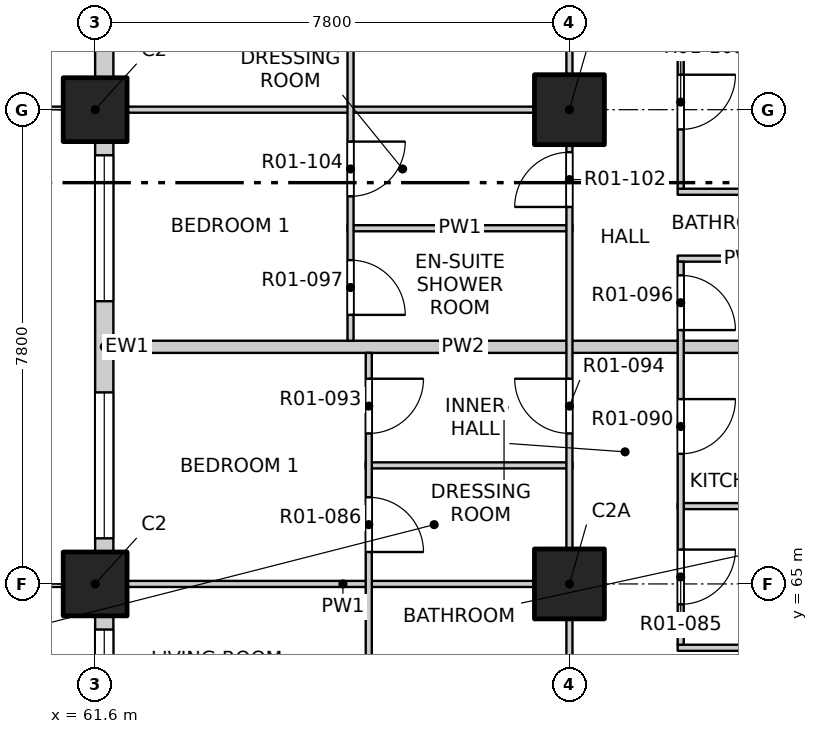
"""IFC4 building model, lengths in metres.
Left out: names, types, materials, properties, quantities, classifications, styles, units other than length and angle.
Written with IfcOpenShell. Run it as: python <this file> out.ifc"""

import sys

from ifc_helpers import new_model, si_unit, direction, frame, frame_2d, origin, origin_2d, place, context, subcontext, project, spatial, rectangle, extrude, element, fill, save


model = new_model("IFC4")
c1 = context("Model", 3, precision=1e-05, world=origin(), true_north=direction((0.0, 1.0)))
c2 = subcontext(c1, "Body", "Model", "MODEL_VIEW")
j1 = project(units=[si_unit("LENGTHUNIT", "METRE"), si_unit("PLANEANGLEUNIT", "RADIAN")], contexts=[c1])
p1 = place(None, origin())
s1 = spatial("IfcSite", under=j1, at=p1, CompositionType="ELEMENT")
p2 = place(p1, origin())
s2 = spatial("IfcBuilding", under=s1, at=p2, CompositionType="ELEMENT")
p3 = place(p2, frame((0.0, 0.0, 19.5)))
s3 = spatial("IfcBuildingStorey", under=s2, at=p3, CompositionType="ELEMENT", Elevation=19.5)
for number, where, z_axis, x_axis in (
    (1, (61.6, 65.0, -0.25), (0.0, 0.0, 1.0), (1.0, 0.0, 0.0)),
    (2, (61.6, 72.8, -0.25), (0.0, 0.0, 1.0), (1.0, 0.0, 0.0)),
):
    element("IfcColumn", number, at=place(p3, frame(where, z_axis=z_axis, x_axis=x_axis)), inside=s3, PredefinedType="COLUMN", context=c2, shape_type="SweptSolid", body=[
        extrude(rectangle(XDim=1.05, YDim=1.05, at=origin_2d()), origin(), (0.0, 0.0, 1.0), 3.4),
    ])
for number, where, z_axis, x_axis in (
    (3, (69.4, 65.0, -0.25), (0.0, 0.0, 1.0), (1.0, 0.0, 0.0)),
    (4, (69.4, 72.8, -0.25), (0.0, 0.0, 1.0), (1.0, 0.0, 0.0)),
):
    element("IfcColumn", number, at=place(p3, frame(where, z_axis=z_axis, x_axis=x_axis)), inside=s3, PredefinedType="COLUMN", context=c2, shape_type="SweptSolid", body=[
        extrude(rectangle(XDim=1.15, YDim=1.15, at=origin_2d()), origin(), (0.0, 0.0, 1.0), 3.4),
    ])
p4 = place(p3, frame((61.75, 57.725, 0.0), z_axis=(0.0, 0.0, 1.0), x_axis=(0.0, 1.0, 0.0)))
e5 = element("IfcWall", 5, at=p4, inside=s3, PredefinedType="SOLIDWALL", context=c2, shape_type="SweptSolid", body=[
    extrude(rectangle(XDim=6.75, YDim=0.3, at=frame_2d((3.375, 0.0))), origin(), (0.0, 0.0, 1.0), 2.7),
])
p5 = place(p4, frame((0.525, 0.0, 0.0)))
e6 = element("IfcOpeningElement", 6, at=p5, cuts=e5, PredefinedType="OPENING", context=c2, shape_type="SweptSolid", body=[
    extrude(rectangle(XDim=1.8, YDim=2.4, at=frame_2d((0.9, 1.2))), frame((0.0, 0.16, 0.0), z_axis=(0.0, -1.0, 0.0), x_axis=(1.0, 0.0, 0.0)), (0.0, 0.0, 1.0), 0.32),
])
p6 = place(p4, frame((4.125, 0.0, 0.9)))
e7 = element("IfcOpeningElement", 7, at=p6, cuts=e5, PredefinedType="OPENING", context=c2, shape_type="SweptSolid", body=[
    extrude(rectangle(XDim=2.4, YDim=1.8, at=frame_2d((1.2, 0.9))), frame((0.0, 0.16, 0.0), z_axis=(0.0, -1.0, 0.0), x_axis=(1.0, 0.0, 0.0)), (0.0, 0.0, 1.0), 0.32),
])
p7 = place(p3, frame((61.75, 65.525, 0.0), z_axis=(0.0, 0.0, 1.0), x_axis=(0.0, 1.0, 0.0)))
e8 = element("IfcWall", 8, at=p7, inside=s3, PredefinedType="SOLIDWALL", context=c2, shape_type="SweptSolid", body=[
    extrude(rectangle(XDim=6.75, YDim=0.3, at=frame_2d((3.375, 0.0))), origin(), (0.0, 0.0, 1.0), 2.7),
])
p8 = place(p7, frame((0.225, 0.0, 0.9)))
e9 = element("IfcOpeningElement", 9, at=p8, cuts=e8, PredefinedType="OPENING", context=c2, shape_type="SweptSolid", body=[
    extrude(rectangle(XDim=2.4, YDim=1.8, at=frame_2d((1.2, 0.9))), frame((0.0, 0.16, 0.0), z_axis=(0.0, -1.0, 0.0), x_axis=(1.0, 0.0, 0.0)), (0.0, 0.0, 1.0), 0.32),
])
p9 = place(p7, frame((4.125, 0.0, 0.9)))
e10 = element("IfcOpeningElement", 10, at=p9, cuts=e8, PredefinedType="OPENING", context=c2, shape_type="SweptSolid", body=[
    extrude(rectangle(XDim=2.4, YDim=1.8, at=frame_2d((1.2, 0.9))), frame((0.0, 0.16, 0.0), z_axis=(0.0, -1.0, 0.0), x_axis=(1.0, 0.0, 0.0)), (0.0, 0.0, 1.0), 0.32),
])
p10 = place(p3, frame((61.75, 73.325, 0.0), z_axis=(0.0, 0.0, 1.0), x_axis=(0.0, 1.0, 0.0)))
e11 = element("IfcWall", 11, at=p10, inside=s3, PredefinedType="SOLIDWALL", context=c2, shape_type="SweptSolid", body=[
    extrude(rectangle(XDim=6.75, YDim=0.3, at=frame_2d((3.375, 0.0))), origin(), (0.0, 0.0, 1.0), 2.7),
])
p11 = place(p10, frame((0.525, 0.0, 0.0)))
e12 = element("IfcOpeningElement", 12, at=p11, cuts=e11, PredefinedType="OPENING", context=c2, shape_type="SweptSolid", body=[
    extrude(rectangle(XDim=1.8, YDim=2.4, at=frame_2d((0.9, 1.2))), frame((0.0, 0.16, 0.0), z_axis=(0.0, -1.0, 0.0), x_axis=(1.0, 0.0, 0.0)), (0.0, 0.0, 1.0), 0.32),
])
p12 = place(p10, frame((4.125, 0.0, 0.9)))
e13 = element("IfcOpeningElement", 13, at=p12, cuts=e11, PredefinedType="OPENING", context=c2, shape_type="SweptSolid", body=[
    extrude(rectangle(XDim=2.4, YDim=1.8, at=frame_2d((1.2, 0.9))), frame((0.0, 0.16, 0.0), z_axis=(0.0, -1.0, 0.0), x_axis=(1.0, 0.0, 0.0)), (0.0, 0.0, 1.0), 0.32),
])
p13 = place(p3, frame((71.18, 63.95, 0.0), z_axis=(0.0, 0.0, 1.0), x_axis=(1.0, 0.0, 0.0)))
e14 = element("IfcWall", 14, at=p13, inside=s3, PredefinedType="PARTITIONING", context=c2, shape_type="SweptSolid", body=[
    extrude(rectangle(XDim=2.22, YDim=0.1, at=frame_2d((1.11, 0.0))), origin(), (0.0, 0.0, 1.0), 3.15),
])
p14 = place(p3, frame((61.9, 65.0, 0.0), z_axis=(0.0, 0.0, 1.0), x_axis=(1.0, 0.0, 0.0)))
e15 = element("IfcWall", 15, at=p14, inside=s3, PredefinedType="PARTITIONING", context=c2, shape_type="SweptSolid", body=[
    extrude(rectangle(XDim=7.55, YDim=0.1, at=frame_2d((3.775, 0.0))), origin(), (0.0, 0.0, 1.0), 2.55),
])
p15 = place(p3, frame((71.18, 66.28, 0.0), z_axis=(0.0, 0.0, 1.0), x_axis=(1.0, 0.0, 0.0)))
e16 = element("IfcWall", 16, at=p15, inside=s3, PredefinedType="PARTITIONING", context=c2, shape_type="SweptSolid", body=[
    extrude(rectangle(XDim=2.22, YDim=0.1, at=frame_2d((1.11, 0.0))), origin(), (0.0, 0.0, 1.0), 3.15),
])
p16 = place(p3, frame((66.05, 66.95, 0.0), z_axis=(0.0, 0.0, 1.0), x_axis=(1.0, 0.0, 0.0)))
e17 = element("IfcWall", 17, at=p16, inside=s3, PredefinedType="PARTITIONING", context=c2, shape_type="SweptSolid", body=[
    extrude(rectangle(XDim=3.4, YDim=0.1, at=frame_2d((1.7, 0.0))), origin(), (0.0, 0.0, 1.0), 3.15),
])
p17 = place(p3, frame((61.9, 68.9, 0.0), z_axis=(0.0, 0.0, 1.0), x_axis=(1.0, 0.0, 0.0)))
e18 = element("IfcWall", 18, at=p17, inside=s3, PredefinedType="PARTITIONING", context=c2, shape_type="SweptSolid", body=[
    extrude(rectangle(XDim=11.5, YDim=0.2, at=frame_2d((5.75, 0.0))), origin(), (0.0, 0.0, 1.0), 3.15),
])
p18 = place(p3, frame((71.18, 70.35, 0.0), z_axis=(0.0, 0.0, 1.0), x_axis=(1.0, 0.0, 0.0)))
e19 = element("IfcWall", 19, at=p18, inside=s3, PredefinedType="PARTITIONING", context=c2, shape_type="SweptSolid", body=[
    extrude(rectangle(XDim=2.22, YDim=0.1, at=frame_2d((1.11, 0.0))), origin(), (0.0, 0.0, 1.0), 3.15),
])
p19 = place(p3, frame((65.75, 70.85, 0.0), z_axis=(0.0, 0.0, 1.0), x_axis=(1.0, 0.0, 0.0)))
e20 = element("IfcWall", 20, at=p19, inside=s3, PredefinedType="PARTITIONING", context=c2, shape_type="SweptSolid", body=[
    extrude(rectangle(XDim=3.7, YDim=0.1, at=frame_2d((1.85, 0.0))), origin(), (0.0, 0.0, 1.0), 3.15),
])
p20 = place(p3, frame((71.18, 71.45, 0.0), z_axis=(0.0, 0.0, 1.0), x_axis=(1.0, 0.0, 0.0)))
e21 = element("IfcWall", 21, at=p20, inside=s3, PredefinedType="PARTITIONING", context=c2, shape_type="SweptSolid", body=[
    extrude(rectangle(XDim=2.22, YDim=0.1, at=frame_2d((1.11, 0.0))), origin(), (0.0, 0.0, 1.0), 3.15),
])
p21 = place(p3, frame((61.9, 72.8, 0.0), z_axis=(0.0, 0.0, 1.0), x_axis=(1.0, 0.0, 0.0)))
e22 = element("IfcWall", 22, at=p21, inside=s3, PredefinedType="PARTITIONING", context=c2, shape_type="SweptSolid", body=[
    extrude(rectangle(XDim=7.55, YDim=0.1, at=frame_2d((3.775, 0.0))), origin(), (0.0, 0.0, 1.0), 2.55),
])
p22 = place(p3, frame((65.8, 69.0, 0.0), z_axis=(0.0, 0.0, 1.0), x_axis=(0.0, 1.0, 0.0)))
e23 = element("IfcWall", 23, at=p22, inside=s3, PredefinedType="PARTITIONING", context=c2, shape_type="SweptSolid", body=[
    extrude(rectangle(XDim=7.6, YDim=0.1, at=frame_2d((3.8, 0.0))), origin(), (0.0, 0.0, 1.0), 3.15),
])
p23 = place(p22, frame((0.425, 0.0, 0.0)))
e24 = element("IfcOpeningElement", 24, at=p23, cuts=e23, PredefinedType="OPENING", context=c2, shape_type="SweptSolid", body=[
    extrude(rectangle(XDim=0.9, YDim=2.1, at=frame_2d((0.45, 1.05))), frame((0.0, 0.06, 0.0), z_axis=(0.0, -1.0, 0.0), x_axis=(1.0, 0.0, 0.0)), (0.0, 0.0, 1.0), 0.12),
])
p24 = place(p22, frame((2.375, 0.0, 0.0)))
e25 = element("IfcOpeningElement", 25, at=p24, cuts=e23, PredefinedType="OPENING", context=c2, shape_type="SweptSolid", body=[
    extrude(rectangle(XDim=0.9, YDim=2.1, at=frame_2d((0.45, 1.05))), frame((0.0, 0.06, 0.0), z_axis=(0.0, -1.0, 0.0), x_axis=(1.0, 0.0, 0.0)), (0.0, 0.0, 1.0), 0.12),
])
p25 = place(p22, frame((5.15, 0.0, 0.0)))
e26 = element("IfcOpeningElement", 26, at=p25, cuts=e23, PredefinedType="OPENING", context=c2, shape_type="SweptSolid", body=[
    extrude(rectangle(XDim=1.2, YDim=2.1, at=frame_2d((0.6, 1.05))), frame((0.0, 0.06, 0.0), z_axis=(0.0, -1.0, 0.0), x_axis=(1.0, 0.0, 0.0)), (0.0, 0.0, 1.0), 0.12),
])
p26 = place(p3, frame((66.1, 61.2, 0.0), z_axis=(0.0, 0.0, 1.0), x_axis=(0.0, 1.0, 0.0)))
e27 = element("IfcWall", 27, at=p26, inside=s3, PredefinedType="PARTITIONING", context=c2, shape_type="SweptSolid", body=[
    extrude(rectangle(XDim=7.6, YDim=0.1, at=frame_2d((3.8, 0.0))), origin(), (0.0, 0.0, 1.0), 3.15),
])
p27 = place(p26, frame((1.25, 0.0, 0.0)))
e28 = element("IfcOpeningElement", 28, at=p27, cuts=e27, PredefinedType="OPENING", context=c2, shape_type="SweptSolid", body=[
    extrude(rectangle(XDim=1.2, YDim=2.1, at=frame_2d((0.6, 1.05))), frame((0.0, 0.06, 0.0), z_axis=(0.0, -1.0, 0.0), x_axis=(1.0, 0.0, 0.0)), (0.0, 0.0, 1.0), 0.12),
])
p28 = place(p26, frame((4.325, 0.0, 0.0)))
e29 = element("IfcOpeningElement", 29, at=p28, cuts=e27, PredefinedType="OPENING", context=c2, shape_type="SweptSolid", body=[
    extrude(rectangle(XDim=0.9, YDim=2.1, at=frame_2d((0.45, 1.05))), frame((0.0, 0.06, 0.0), z_axis=(0.0, -1.0, 0.0), x_axis=(1.0, 0.0, 0.0)), (0.0, 0.0, 1.0), 0.12),
])
p29 = place(p26, frame((6.275, 0.0, 0.0)))
e30 = element("IfcOpeningElement", 30, at=p29, cuts=e27, PredefinedType="OPENING", context=c2, shape_type="SweptSolid", body=[
    extrude(rectangle(XDim=0.9, YDim=2.1, at=frame_2d((0.45, 1.05))), frame((0.0, 0.06, 0.0), z_axis=(0.0, -1.0, 0.0), x_axis=(1.0, 0.0, 0.0)), (0.0, 0.0, 1.0), 0.12),
])
p30 = place(p3, frame((69.4, 49.4, 0.0), z_axis=(0.0, 0.0, 1.0), x_axis=(0.0, 1.0, 0.0)))
e31 = element("IfcWall", 31, at=p30, inside=s3, PredefinedType="PARTITIONING", context=c2, shape_type="SweptSolid", body=[
    extrude(rectangle(XDim=31.2, YDim=0.1, at=frame_2d((15.6, 0.0))), origin(), (0.0, 0.0, 1.0), 3.15),
])
p31 = place(p30, frame((1.5, 0.0, 0.0)))
e32 = element("IfcOpeningElement", 32, at=p31, cuts=e31, PredefinedType="OPENING", context=c2, shape_type="SweptSolid", body=[
    extrude(rectangle(XDim=0.9, YDim=2.1, at=frame_2d((0.45, 1.05))), frame((0.0, 0.06, 0.0), z_axis=(0.0, -1.0, 0.0), x_axis=(1.0, 0.0, 0.0)), (0.0, 0.0, 1.0), 0.12),
])
p32 = place(p30, frame((6.225, 0.0, 0.0)))
e33 = element("IfcOpeningElement", 33, at=p32, cuts=e31, PredefinedType="OPENING", context=c2, shape_type="SweptSolid", body=[
    extrude(rectangle(XDim=0.9, YDim=2.1, at=frame_2d((0.45, 1.05))), frame((0.0, 0.06, 0.0), z_axis=(0.0, -1.0, 0.0), x_axis=(1.0, 0.0, 0.0)), (0.0, 0.0, 1.0), 0.12),
])
p33 = place(p30, frame((10.275, 0.0, 0.0)))
e34 = element("IfcOpeningElement", 34, at=p33, cuts=e31, PredefinedType="OPENING", context=c2, shape_type="SweptSolid", body=[
    extrude(rectangle(XDim=0.9, YDim=2.1, at=frame_2d((0.45, 1.05))), frame((0.0, 0.06, 0.0), z_axis=(0.0, -1.0, 0.0), x_axis=(1.0, 0.0, 0.0)), (0.0, 0.0, 1.0), 0.12),
])
p34 = place(p30, frame((13.2, 0.0, 0.0)))
e35 = element("IfcOpeningElement", 35, at=p34, cuts=e31, PredefinedType="OPENING", context=c2, shape_type="SweptSolid", body=[
    extrude(rectangle(XDim=0.9, YDim=2.1, at=frame_2d((0.45, 1.05))), frame((0.0, 0.06, 0.0), z_axis=(0.0, -1.0, 0.0), x_axis=(1.0, 0.0, 0.0)), (0.0, 0.0, 1.0), 0.12),
])
p35 = place(p30, frame((18.075, 0.0, 0.0)))
e36 = element("IfcOpeningElement", 36, at=p35, cuts=e31, PredefinedType="OPENING", context=c2, shape_type="SweptSolid", body=[
    extrude(rectangle(XDim=0.9, YDim=2.1, at=frame_2d((0.45, 1.05))), frame((0.0, 0.06, 0.0), z_axis=(0.0, -1.0, 0.0), x_axis=(1.0, 0.0, 0.0)), (0.0, 0.0, 1.0), 0.12),
])
p36 = place(p30, frame((21.8, 0.0, 0.0)))
e37 = element("IfcOpeningElement", 37, at=p36, cuts=e31, PredefinedType="OPENING", context=c2, shape_type="SweptSolid", body=[
    extrude(rectangle(XDim=0.9, YDim=2.1, at=frame_2d((0.45, 1.05))), frame((0.0, 0.06, 0.0), z_axis=(0.0, -1.0, 0.0), x_axis=(1.0, 0.0, 0.0)), (0.0, 0.0, 1.0), 0.12),
])
p37 = place(p30, frame((24.9, 0.0, 0.0)))
e38 = element("IfcOpeningElement", 38, at=p37, cuts=e31, PredefinedType="OPENING", context=c2, shape_type="SweptSolid", body=[
    extrude(rectangle(XDim=0.9, YDim=2.1, at=frame_2d((0.45, 1.05))), frame((0.0, 0.06, 0.0), z_axis=(0.0, -1.0, 0.0), x_axis=(1.0, 0.0, 0.0)), (0.0, 0.0, 1.0), 0.12),
])
p38 = place(p30, frame((29.6, 0.0, 0.0)))
e39 = element("IfcOpeningElement", 39, at=p38, cuts=e31, PredefinedType="OPENING", context=c2, shape_type="SweptSolid", body=[
    extrude(rectangle(XDim=0.9, YDim=2.1, at=frame_2d((0.45, 1.05))), frame((0.0, 0.06, 0.0), z_axis=(0.0, -1.0, 0.0), x_axis=(1.0, 0.0, 0.0)), (0.0, 0.0, 1.0), 0.12),
])
p39 = place(p3, frame((71.23, 64.0, 0.0), z_axis=(0.0, 0.0, 1.0), x_axis=(0.0, 1.0, 0.0)))
e40 = element("IfcWall", 40, at=p39, inside=s3, PredefinedType="PARTITIONING", context=c2, shape_type="SweptSolid", body=[
    extrude(rectangle(XDim=6.3, YDim=0.1, at=frame_2d((3.15, 0.0))), origin(), (0.0, 0.0, 1.0), 3.15),
])
p40 = place(p39, frame((0.665, 0.0, 0.0)))
e41 = element("IfcOpeningElement", 41, at=p40, cuts=e40, PredefinedType="OPENING", context=c2, shape_type="SweptSolid", body=[
    extrude(rectangle(XDim=0.9, YDim=2.1, at=frame_2d((0.45, 1.05))), frame((0.0, 0.06, 0.0), z_axis=(0.0, -1.0, 0.0), x_axis=(1.0, 0.0, 0.0)), (0.0, 0.0, 1.0), 0.12),
])
p41 = place(p39, frame((3.14, 0.0, 0.0)))
e42 = element("IfcOpeningElement", 42, at=p41, cuts=e40, PredefinedType="OPENING", context=c2, shape_type="SweptSolid", body=[
    extrude(rectangle(XDim=0.9, YDim=2.1, at=frame_2d((0.45, 1.05))), frame((0.0, 0.06, 0.0), z_axis=(0.0, -1.0, 0.0), x_axis=(1.0, 0.0, 0.0)), (0.0, 0.0, 1.0), 0.12),
])
p42 = place(p39, frame((5.175, 0.0, 0.0)))
e43 = element("IfcOpeningElement", 43, at=p42, cuts=e40, PredefinedType="OPENING", context=c2, shape_type="SweptSolid", body=[
    extrude(rectangle(XDim=0.9, YDim=2.1, at=frame_2d((0.45, 1.05))), frame((0.0, 0.06, 0.0), z_axis=(0.0, -1.0, 0.0), x_axis=(1.0, 0.0, 0.0)), (0.0, 0.0, 1.0), 0.12),
])
p43 = place(p3, frame((71.23, 71.5, 0.0), z_axis=(0.0, 0.0, 1.0), x_axis=(0.0, 1.0, 0.0)))
e44 = element("IfcWall", 44, at=p43, inside=s3, PredefinedType="PARTITIONING", context=c2, shape_type="SweptSolid", body=[
    extrude(rectangle(XDim=6.5, YDim=0.1, at=frame_2d((3.25, 0.0))), origin(), (0.0, 0.0, 1.0), 3.15),
])
p44 = place(p43, frame((0.975, 0.0, 0.0)))
e45 = element("IfcOpeningElement", 45, at=p44, cuts=e44, PredefinedType="OPENING", context=c2, shape_type="SweptSolid", body=[
    extrude(rectangle(XDim=0.9, YDim=2.1, at=frame_2d((0.45, 1.05))), frame((0.0, 0.06, 0.0), z_axis=(0.0, -1.0, 0.0), x_axis=(1.0, 0.0, 0.0)), (0.0, 0.0, 1.0), 0.12),
])
p45 = place(p43, frame((3.65, 0.0, 0.0)))
e46 = element("IfcOpeningElement", 46, at=p45, cuts=e44, PredefinedType="OPENING", context=c2, shape_type="SweptSolid", body=[
    extrude(rectangle(XDim=0.8, YDim=2.1, at=frame_2d((0.4, 1.05))), frame((0.0, 0.06, 0.0), z_axis=(0.0, -1.0, 0.0), x_axis=(1.0, 0.0, 0.0)), (0.0, 0.0, 1.0), 0.12),
])
p46 = place(p43, frame((5.475, 0.0, 0.0)))
e47 = element("IfcOpeningElement", 47, at=p46, cuts=e44, PredefinedType="OPENING", context=c2, shape_type="SweptSolid", body=[
    extrude(rectangle(XDim=0.8, YDim=2.1, at=frame_2d((0.4, 1.05))), frame((0.0, 0.06, 0.0), z_axis=(0.0, -1.0, 0.0), x_axis=(1.0, 0.0, 0.0)), (0.0, 0.0, 1.0), 0.12),
])
p47 = place(p6, origin())
e48 = element("IfcWindow", 48, at=p47, inside=s3, PartitioningType="DOUBLE_PANEL_VERTICAL", PredefinedType="WINDOW", context=c2, shape_type="SweptSolid", body=[
    extrude(rectangle(XDim=2.4, YDim=1.8, at=frame_2d((1.2, 0.9))), frame((0.0, 0.03, 0.0), z_axis=(0.0, -1.0, 0.0), x_axis=(1.0, 0.0, 0.0)), (0.0, 0.0, 1.0), 0.06),
])
fill(e7, e48)
p48 = place(p8, origin())
e49 = element("IfcWindow", 49, at=p48, inside=s3, PartitioningType="DOUBLE_PANEL_VERTICAL", PredefinedType="WINDOW", context=c2, shape_type="SweptSolid", body=[
    extrude(rectangle(XDim=2.4, YDim=1.8, at=frame_2d((1.2, 0.9))), frame((0.0, 0.03, 0.0), z_axis=(0.0, -1.0, 0.0), x_axis=(1.0, 0.0, 0.0)), (0.0, 0.0, 1.0), 0.06),
])
fill(e9, e49)
p49 = place(p9, origin())
e50 = element("IfcWindow", 50, at=p49, inside=s3, PartitioningType="DOUBLE_PANEL_VERTICAL", PredefinedType="WINDOW", context=c2, shape_type="SweptSolid", body=[
    extrude(rectangle(XDim=2.4, YDim=1.8, at=frame_2d((1.2, 0.9))), frame((0.0, 0.03, 0.0), z_axis=(0.0, -1.0, 0.0), x_axis=(1.0, 0.0, 0.0)), (0.0, 0.0, 1.0), 0.06),
])
fill(e10, e50)
p50 = place(p40, origin())
e51 = element("IfcDoor", 51, at=p50, inside=s3, OperationType="SINGLE_SWING_LEFT", PredefinedType="DOOR", context=c2, shape_type="SweptSolid", body=[
    extrude(rectangle(XDim=0.9, YDim=2.1, at=frame_2d((0.45, 1.05))), frame((0.0, 0.025, 0.0), z_axis=(0.0, -1.0, 0.0), x_axis=(1.0, 0.0, 0.0)), (0.0, 0.0, 1.0), 0.05),
])
fill(e41, e51)
p51 = place(p28, origin())
e52 = element("IfcDoor", 52, at=p51, inside=s3, OperationType="SINGLE_SWING_RIGHT", PredefinedType="DOOR", context=c2, shape_type="SweptSolid", body=[
    extrude(rectangle(XDim=0.9, YDim=2.1, at=frame_2d((0.45, 1.05))), frame((0.0, 0.025, 0.0), z_axis=(0.0, -1.0, 0.0), x_axis=(1.0, 0.0, 0.0)), (0.0, 0.0, 1.0), 0.05),
])
fill(e29, e52)
p52 = place(p41, origin())
e53 = element("IfcDoor", 53, at=p52, inside=s3, OperationType="SINGLE_SWING_LEFT", PredefinedType="DOOR", context=c2, shape_type="SweptSolid", body=[
    extrude(rectangle(XDim=0.9, YDim=2.1, at=frame_2d((0.45, 1.05))), frame((0.0, 0.025, 0.0), z_axis=(0.0, -1.0, 0.0), x_axis=(1.0, 0.0, 0.0)), (0.0, 0.0, 1.0), 0.05),
])
fill(e42, e53)
p53 = place(p29, origin())
e54 = element("IfcDoor", 54, at=p53, inside=s3, OperationType="SINGLE_SWING_LEFT", PredefinedType="DOOR", context=c2, shape_type="SweptSolid", body=[
    extrude(rectangle(XDim=0.9, YDim=2.1, at=frame_2d((0.45, 1.05))), frame((0.0, 0.025, 0.0), z_axis=(0.0, -1.0, 0.0), x_axis=(1.0, 0.0, 0.0)), (0.0, 0.0, 1.0), 0.05),
])
fill(e30, e54)
p54 = place(p35, origin())
e55 = element("IfcDoor", 55, at=p54, inside=s3, OperationType="SINGLE_SWING_RIGHT", PredefinedType="DOOR", context=c2, shape_type="SweptSolid", body=[
    extrude(rectangle(XDim=0.9, YDim=2.1, at=frame_2d((0.45, 1.05))), frame((0.0, 0.025, 0.0), z_axis=(0.0, -1.0, 0.0), x_axis=(1.0, 0.0, 0.0)), (0.0, 0.0, 1.0), 0.05),
])
fill(e36, e55)
p55 = place(p42, origin())
e56 = element("IfcDoor", 56, at=p55, inside=s3, OperationType="SINGLE_SWING_RIGHT", PredefinedType="DOOR", context=c2, shape_type="SweptSolid", body=[
    extrude(rectangle(XDim=0.9, YDim=2.1, at=frame_2d((0.45, 1.05))), frame((0.0, 0.025, 0.0), z_axis=(0.0, -1.0, 0.0), x_axis=(1.0, 0.0, 0.0)), (0.0, 0.0, 1.0), 0.05),
])
fill(e43, e56)
p56 = place(p23, origin())
e57 = element("IfcDoor", 57, at=p56, inside=s3, OperationType="SINGLE_SWING_RIGHT", PredefinedType="DOOR", context=c2, shape_type="SweptSolid", body=[
    extrude(rectangle(XDim=0.9, YDim=2.1, at=frame_2d((0.45, 1.05))), frame((0.0, 0.025, 0.0), z_axis=(0.0, -1.0, 0.0), x_axis=(1.0, 0.0, 0.0)), (0.0, 0.0, 1.0), 0.05),
])
fill(e24, e57)
p57 = place(p36, origin())
e58 = element("IfcDoor", 58, at=p57, inside=s3, OperationType="SINGLE_SWING_LEFT", PredefinedType="DOOR", context=c2, shape_type="SweptSolid", body=[
    extrude(rectangle(XDim=0.9, YDim=2.1, at=frame_2d((0.45, 1.05))), frame((0.0, 0.025, 0.0), z_axis=(0.0, -1.0, 0.0), x_axis=(1.0, 0.0, 0.0)), (0.0, 0.0, 1.0), 0.05),
])
fill(e37, e58)
p58 = place(p24, origin())
e59 = element("IfcDoor", 59, at=p58, inside=s3, OperationType="SINGLE_SWING_LEFT", PredefinedType="DOOR", context=c2, shape_type="SweptSolid", body=[
    extrude(rectangle(XDim=0.9, YDim=2.1, at=frame_2d((0.45, 1.05))), frame((0.0, 0.025, 0.0), z_axis=(0.0, -1.0, 0.0), x_axis=(1.0, 0.0, 0.0)), (0.0, 0.0, 1.0), 0.05),
])
fill(e25, e59)
p59 = place(p44, origin())
e60 = element("IfcDoor", 60, at=p59, inside=s3, OperationType="SINGLE_SWING_LEFT", PredefinedType="DOOR", context=c2, shape_type="SweptSolid", body=[
    extrude(rectangle(XDim=0.9, YDim=2.1, at=frame_2d((0.45, 1.05))), frame((0.0, 0.025, 0.0), z_axis=(0.0, -1.0, 0.0), x_axis=(1.0, 0.0, 0.0)), (0.0, 0.0, 1.0), 0.05),
])
fill(e45, e60)
save(model, sys.argv[1])
